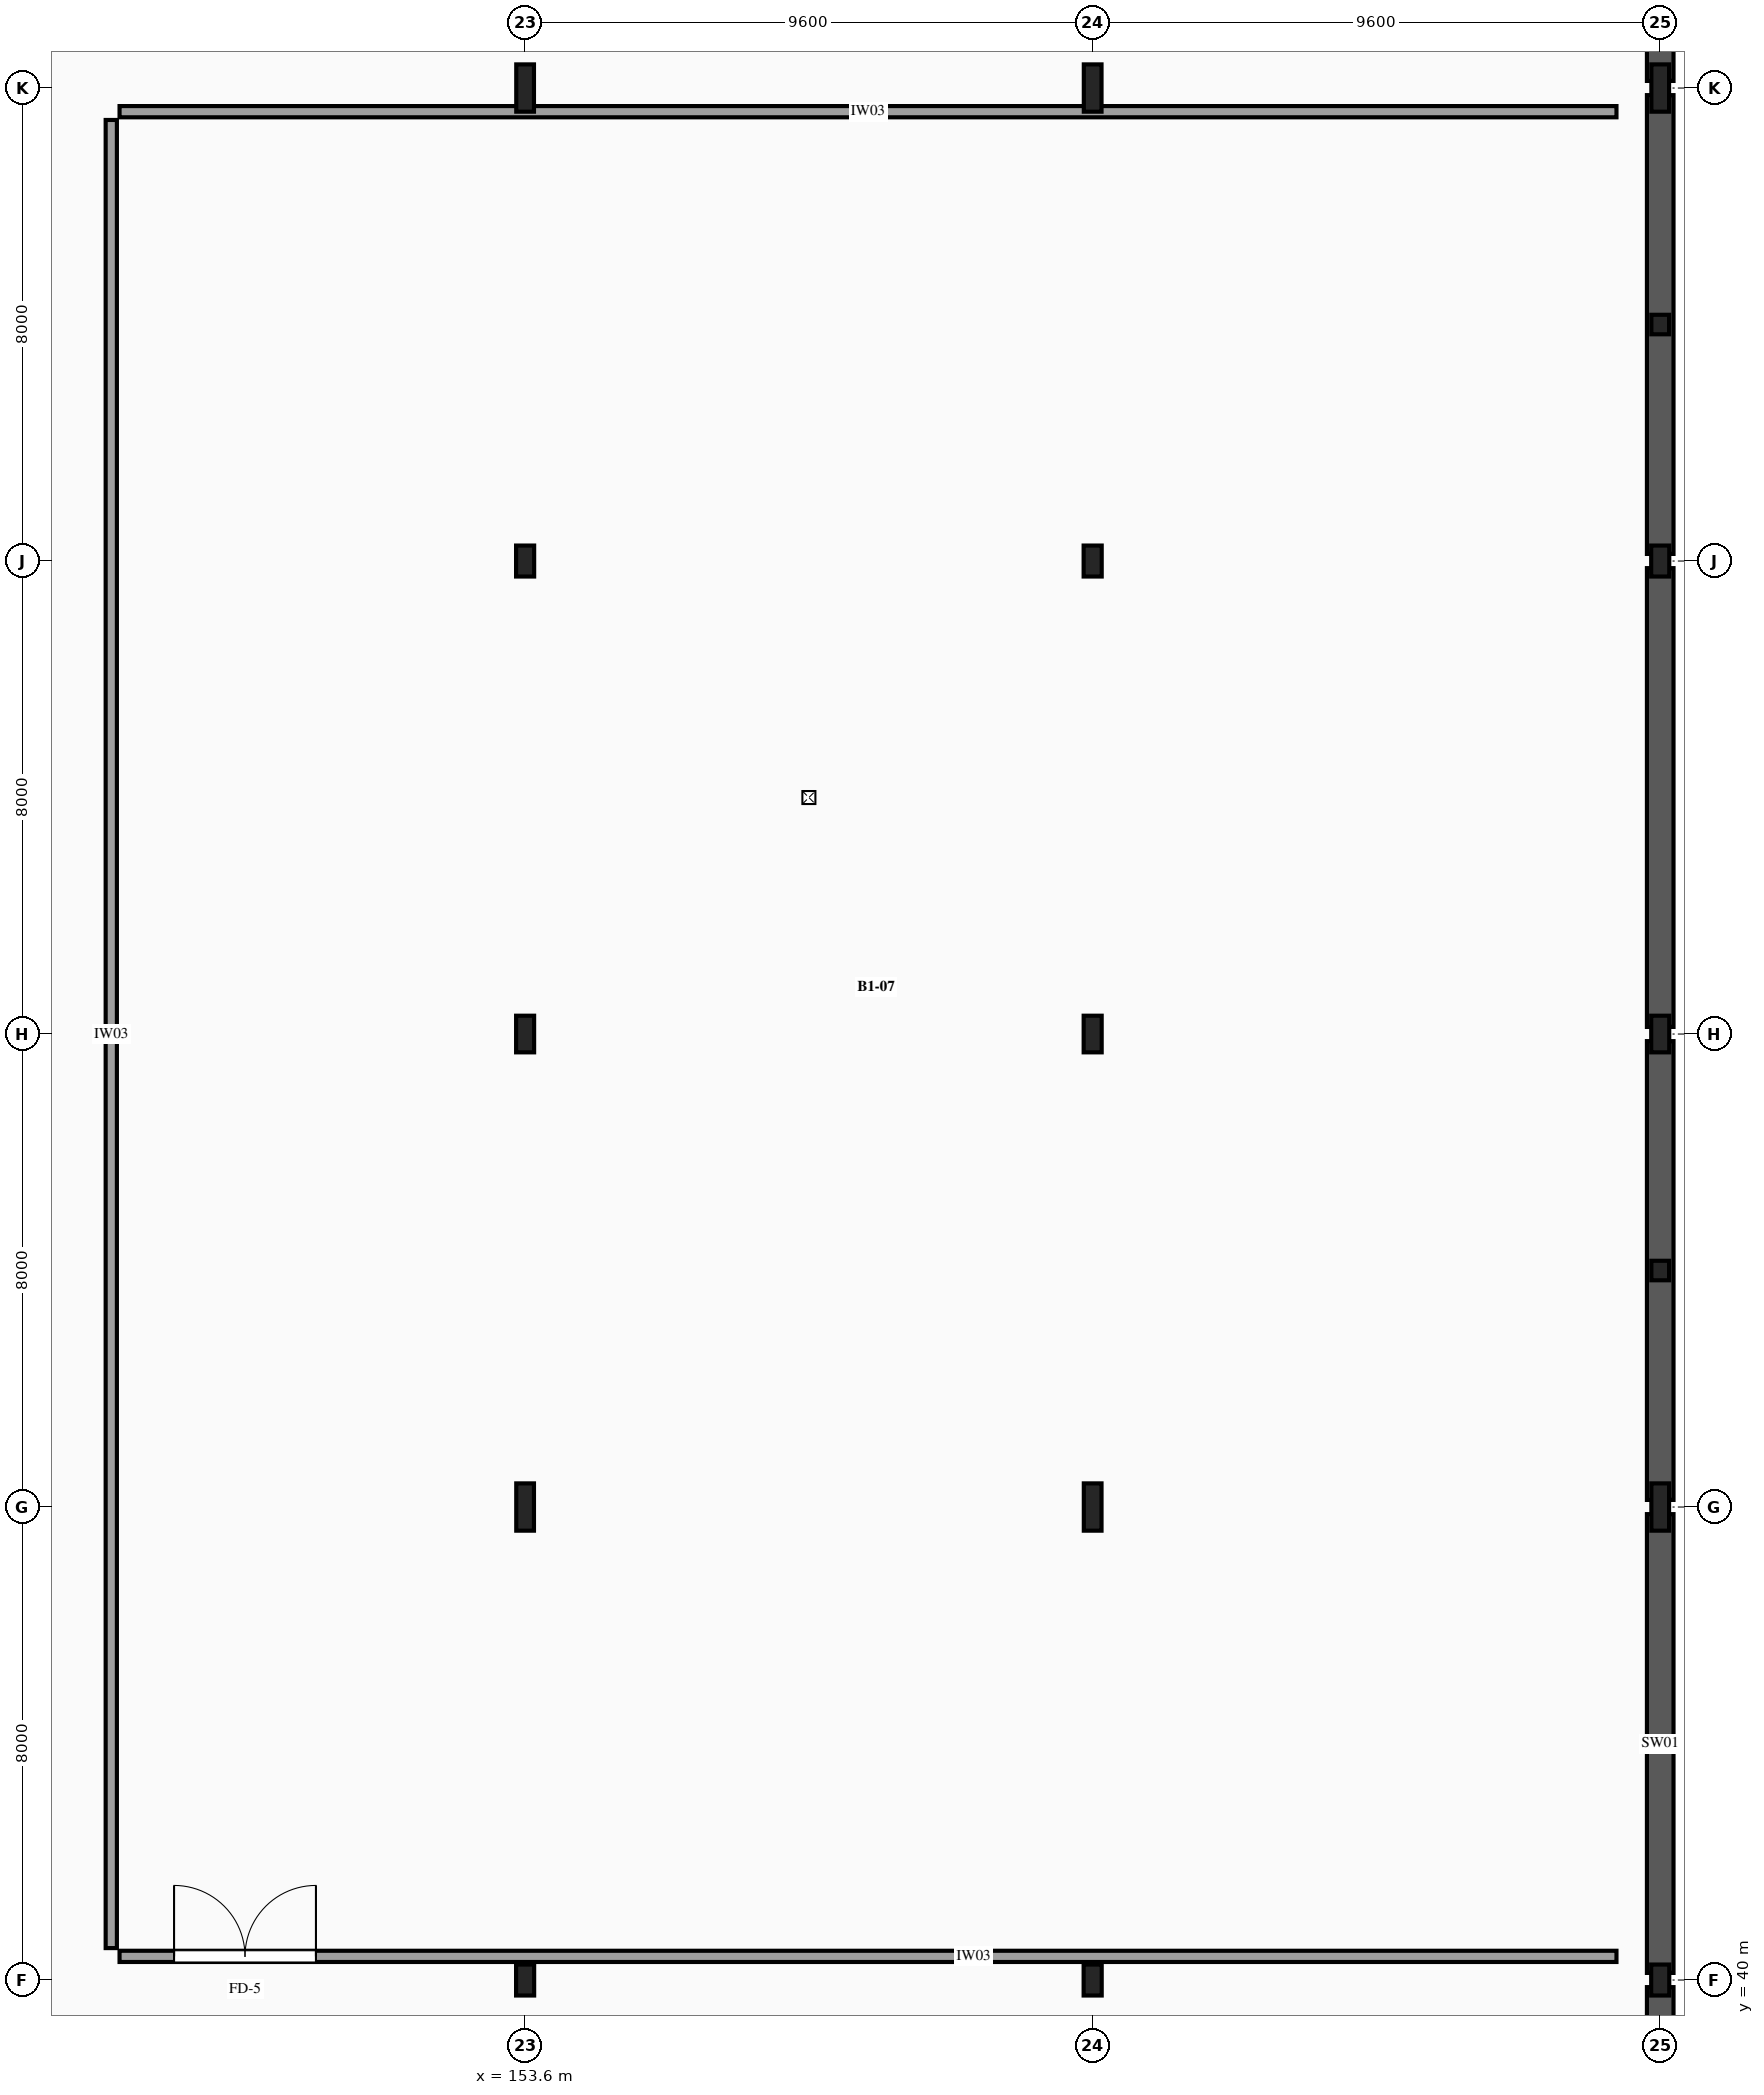
"""IFC4 building model, lengths in metres.
Left out: names, types, materials, properties, quantities, classifications, styles, units other than length and angle.
Written with IfcOpenShell. Run it as: python <this file> out.ifc"""

import sys

from ifc_helpers import new_model, si_unit, direction, frame, frame_2d, origin, origin_2d, place, context, subcontext, project, spatial, rectangle, i_section, extrude, element, fill, save


model = new_model("IFC4")
c1 = context("Model", 3, precision=1e-05, world=origin(), true_north=direction((0.0, 1.0)))
c2 = subcontext(c1, "Body", "Model", "MODEL_VIEW")
j1 = project(units=[si_unit("LENGTHUNIT", "METRE"), si_unit("PLANEANGLEUNIT", "RADIAN")], contexts=[c1])
p1 = place(None, origin())
s1 = spatial("IfcSite", under=j1, at=p1, CompositionType="ELEMENT")
p2 = place(p1, origin())
s2 = spatial("IfcBuilding", under=s1, at=p2, CompositionType="ELEMENT")
p3 = place(p2, frame((0.0, 0.0, -4.5)))
s3 = spatial("IfcBuildingStorey", under=s2, at=p3, CompositionType="ELEMENT", Elevation=-4.5)
p4 = place(p3, frame((153.6, 40.0, 0.0), z_axis=(0.0, 0.0, 1.0), x_axis=(1.0, 0.0, 0.0)))
e1 = element("IfcColumn", 1, at=p4, inside=s3, PredefinedType="COLUMN", context=c2, shape_type="SweptSolid", body=[
    extrude(i_section(OverallWidth=0.306, OverallDepth=0.524, WebThickness=0.021, FlangeThickness=0.04, FilletRadius=0.027, at=origin_2d()), origin(), (0.0, 0.0, 1.0), 4.22),
])
p5 = place(p3, frame((153.6, 48.0, 0.0), z_axis=(0.0, 0.0, 1.0), x_axis=(1.0, 0.0, 0.0)))
e2 = element("IfcColumn", 2, at=p5, inside=s3, PredefinedType="COLUMN", context=c2, shape_type="SweptSolid", body=[
    extrude(i_section(OverallWidth=0.3, OverallDepth=0.8, WebThickness=0.018, FlangeThickness=0.033, FilletRadius=0.03, at=origin_2d()), origin(), (0.0, 0.0, 1.0), 4.22),
])
p6 = place(p3, frame((153.6, 56.0, 0.0), z_axis=(0.0, 0.0, 1.0), x_axis=(1.0, 0.0, 0.0)))
e3 = element("IfcColumn", 3, at=p6, inside=s3, PredefinedType="COLUMN", context=c2, shape_type="SweptSolid", body=[
    extrude(i_section(OverallWidth=0.305, OverallDepth=0.62, WebThickness=0.021, FlangeThickness=0.04, FilletRadius=0.027, at=origin_2d()), origin(), (0.0, 0.0, 1.0), 4.22),
])
p7 = place(p3, frame((153.6, 64.0, 0.0), z_axis=(0.0, 0.0, 1.0), x_axis=(1.0, 0.0, 0.0)))
e4 = element("IfcColumn", 4, at=p7, inside=s3, PredefinedType="COLUMN", context=c2, shape_type="SweptSolid", body=[
    extrude(i_section(OverallWidth=0.306, OverallDepth=0.524, WebThickness=0.021, FlangeThickness=0.04, FilletRadius=0.027, at=origin_2d()), origin(), (0.0, 0.0, 1.0), 4.22),
])
p8 = place(p3, frame((153.6, 72.0, 0.0), z_axis=(0.0, 0.0, 1.0), x_axis=(1.0, 0.0, 0.0)))
e5 = element("IfcColumn", 5, at=p8, inside=s3, PredefinedType="COLUMN", context=c2, shape_type="SweptSolid", body=[
    extrude(i_section(OverallWidth=0.3, OverallDepth=0.8, WebThickness=0.018, FlangeThickness=0.033, FilletRadius=0.03, at=origin_2d()), origin(), (0.0, 0.0, 1.0), 4.22),
])
p9 = place(p3, frame((163.2, 40.0, 0.0), z_axis=(0.0, 0.0, 1.0), x_axis=(1.0, 0.0, 0.0)))
e6 = element("IfcColumn", 6, at=p9, inside=s3, PredefinedType="COLUMN", context=c2, shape_type="SweptSolid", body=[
    extrude(i_section(OverallWidth=0.306, OverallDepth=0.524, WebThickness=0.021, FlangeThickness=0.04, FilletRadius=0.027, at=origin_2d()), origin(), (0.0, 0.0, 1.0), 4.22),
])
p10 = place(p3, frame((163.2, 48.0, 0.0), z_axis=(0.0, 0.0, 1.0), x_axis=(1.0, 0.0, 0.0)))
e7 = element("IfcColumn", 7, at=p10, inside=s3, PredefinedType="COLUMN", context=c2, shape_type="SweptSolid", body=[
    extrude(i_section(OverallWidth=0.3, OverallDepth=0.8, WebThickness=0.018, FlangeThickness=0.033, FilletRadius=0.03, at=origin_2d()), origin(), (0.0, 0.0, 1.0), 4.22),
])
p11 = place(p3, frame((163.2, 56.0, 0.0), z_axis=(0.0, 0.0, 1.0), x_axis=(1.0, 0.0, 0.0)))
e8 = element("IfcColumn", 8, at=p11, inside=s3, PredefinedType="COLUMN", context=c2, shape_type="SweptSolid", body=[
    extrude(i_section(OverallWidth=0.305, OverallDepth=0.62, WebThickness=0.021, FlangeThickness=0.04, FilletRadius=0.027, at=origin_2d()), origin(), (0.0, 0.0, 1.0), 4.22),
])
p12 = place(p3, frame((163.2, 64.0, 0.0), z_axis=(0.0, 0.0, 1.0), x_axis=(1.0, 0.0, 0.0)))
e9 = element("IfcColumn", 9, at=p12, inside=s3, PredefinedType="COLUMN", context=c2, shape_type="SweptSolid", body=[
    extrude(i_section(OverallWidth=0.306, OverallDepth=0.524, WebThickness=0.021, FlangeThickness=0.04, FilletRadius=0.027, at=origin_2d()), origin(), (0.0, 0.0, 1.0), 4.22),
])
p13 = place(p3, frame((163.2, 72.0, 0.0), z_axis=(0.0, 0.0, 1.0), x_axis=(1.0, 0.0, 0.0)))
e10 = element("IfcColumn", 10, at=p13, inside=s3, PredefinedType="COLUMN", context=c2, shape_type="SweptSolid", body=[
    extrude(i_section(OverallWidth=0.3, OverallDepth=0.8, WebThickness=0.018, FlangeThickness=0.033, FilletRadius=0.03, at=origin_2d()), origin(), (0.0, 0.0, 1.0), 4.22),
])
p14 = place(p3, frame((172.8, 40.0, 0.0), z_axis=(0.0, 0.0, 1.0), x_axis=(1.0, 0.0, 0.0)))
e11 = element("IfcColumn", 11, at=p14, inside=s3, PredefinedType="COLUMN", context=c2, shape_type="SweptSolid", body=[
    extrude(i_section(OverallWidth=0.306, OverallDepth=0.524, WebThickness=0.021, FlangeThickness=0.04, FilletRadius=0.027, at=origin_2d()), origin(), (0.0, 0.0, 1.0), 4.22),
])
p15 = place(p3, frame((172.8, 48.0, 0.0), z_axis=(0.0, 0.0, 1.0), x_axis=(1.0, 0.0, 0.0)))
e12 = element("IfcColumn", 12, at=p15, inside=s3, PredefinedType="COLUMN", context=c2, shape_type="SweptSolid", body=[
    extrude(i_section(OverallWidth=0.3, OverallDepth=0.8, WebThickness=0.018, FlangeThickness=0.033, FilletRadius=0.03, at=origin_2d()), origin(), (0.0, 0.0, 1.0), 4.22),
])
p16 = place(p3, frame((172.8, 56.0, 0.0), z_axis=(0.0, 0.0, 1.0), x_axis=(1.0, 0.0, 0.0)))
e13 = element("IfcColumn", 13, at=p16, inside=s3, PredefinedType="COLUMN", context=c2, shape_type="SweptSolid", body=[
    extrude(i_section(OverallWidth=0.305, OverallDepth=0.62, WebThickness=0.021, FlangeThickness=0.04, FilletRadius=0.027, at=origin_2d()), origin(), (0.0, 0.0, 1.0), 4.22),
])
p17 = place(p3, frame((172.8, 64.0, 0.0), z_axis=(0.0, 0.0, 1.0), x_axis=(1.0, 0.0, 0.0)))
e14 = element("IfcColumn", 14, at=p17, inside=s3, PredefinedType="COLUMN", context=c2, shape_type="SweptSolid", body=[
    extrude(i_section(OverallWidth=0.306, OverallDepth=0.524, WebThickness=0.021, FlangeThickness=0.04, FilletRadius=0.027, at=origin_2d()), origin(), (0.0, 0.0, 1.0), 4.22),
])
p18 = place(p3, frame((172.8, 72.0, 0.0), z_axis=(0.0, 0.0, 1.0), x_axis=(1.0, 0.0, 0.0)))
e15 = element("IfcColumn", 15, at=p18, inside=s3, PredefinedType="COLUMN", context=c2, shape_type="SweptSolid", body=[
    extrude(i_section(OverallWidth=0.3, OverallDepth=0.8, WebThickness=0.018, FlangeThickness=0.033, FilletRadius=0.03, at=origin_2d()), origin(), (0.0, 0.0, 1.0), 4.22),
])
for number, where, z_axis, x_axis in (
    (16, (172.8, 52.0, 0.0), (0.0, 0.0, 1.0), (1.0, 0.0, 0.0)),
    (17, (172.8, 68.0, 0.0), (0.0, 0.0, 1.0), (1.0, 0.0, 0.0)),
):
    element("IfcColumn", number, at=place(p3, frame(where, z_axis=z_axis, x_axis=x_axis)), inside=s3, PredefinedType="PILASTER", context=c2, shape_type="SweptSolid", body=[
        extrude(i_section(OverallWidth=0.3, OverallDepth=0.33, WebThickness=0.01, FlangeThickness=0.017, FilletRadius=0.027, at=origin_2d()), origin(), (0.0, 0.0, 1.0), 4.22),
    ])
for number, where, z_axis, x_axis in (
    (18, (172.8, 32.12, 0.0), (0.0, 0.0, 1.0), (0.0, 1.0, 0.0)),
    (19, (172.8, 40.12, 0.0), (0.0, 0.0, 1.0), (0.0, 1.0, 0.0)),
    (20, (172.8, 48.12, 0.0), (0.0, 0.0, 1.0), (0.0, 1.0, 0.0)),
    (21, (172.8, 56.12, 0.0), (0.0, 0.0, 1.0), (0.0, 1.0, 0.0)),
    (22, (172.8, 64.12, 0.0), (0.0, 0.0, 1.0), (0.0, 1.0, 0.0)),
    (23, (172.8, 72.12, 0.0), (0.0, 0.0, 1.0), (0.0, 1.0, 0.0)),
):
    element("IfcWall", number, at=place(p3, frame(where, z_axis=z_axis, x_axis=x_axis)), inside=s3, PredefinedType="SHEAR", context=c2, shape_type="SweptSolid", body=[
        extrude(rectangle(XDim=7.76, YDim=0.45, at=frame_2d((3.88, 0.0))), origin(), (0.0, 0.0, 1.0), 4.22),
    ])
p19 = place(p3, frame((146.74, 71.6, 0.0), z_axis=(0.0, 0.0, 1.0), x_axis=(1.0, 0.0, 0.0)))
e24 = element("IfcWall", 24, at=p19, inside=s3, PredefinedType="SOLIDWALL", context=c2, shape_type="SweptSolid", body=[
    extrude(rectangle(XDim=25.32, YDim=0.19, at=frame_2d((12.66, 0.0))), origin(), (0.0, 0.0, 1.0), 3.58),
])
p20 = place(p3, frame((146.74, 40.4, 0.0), z_axis=(0.0, 0.0, 1.0), x_axis=(1.0, 0.0, 0.0)))
e25 = element("IfcWall", 25, at=p20, inside=s3, PredefinedType="SOLIDWALL", context=c2, shape_type="SweptSolid", body=[
    extrude(rectangle(XDim=25.32, YDim=0.19, at=frame_2d((12.66, 0.0))), origin(), (0.0, 0.0, 1.0), 3.58),
])
p21 = place(p20, frame((0.922, 0.0, 0.0)))
e26 = element("IfcOpeningElement", 26, at=p21, cuts=e25, PredefinedType="OPENING", context=c2, shape_type="SweptSolid", body=[
    extrude(rectangle(XDim=2.4, YDim=2.8, at=frame_2d((1.2, 1.4))), frame((0.0, 0.105, 0.0), z_axis=(0.0, -1.0, 0.0), x_axis=(1.0, 0.0, 0.0)), (0.0, 0.0, 1.0), 0.21),
])
p22 = place(p3, frame((146.6, 40.54, 0.0), z_axis=(0.0, 0.0, 1.0), x_axis=(0.0, 1.0, 0.0)))
e27 = element("IfcWall", 27, at=p22, inside=s3, PredefinedType="SOLIDWALL", context=c2, shape_type="SweptSolid", body=[
    extrude(rectangle(XDim=30.92, YDim=0.19, at=frame_2d((15.46, 0.0))), origin(), (0.0, 0.0, 1.0), 3.58),
])
p23 = place(p21, origin())
e28 = element("IfcDoor", 28, at=p23, inside=s3, OperationType="DOUBLE_DOOR_SINGLE_SWING", PredefinedType="DOOR", context=c2, shape_type="SweptSolid", body=[
    extrude(rectangle(XDim=2.4, YDim=2.8, at=frame_2d((1.2, 1.4))), frame((0.0, 0.025, 0.0), z_axis=(0.0, -1.0, 0.0), x_axis=(1.0, 0.0, 0.0)), (0.0, 0.0, 1.0), 0.05),
])
fill(e26, e28)
save(model, sys.argv[1])
